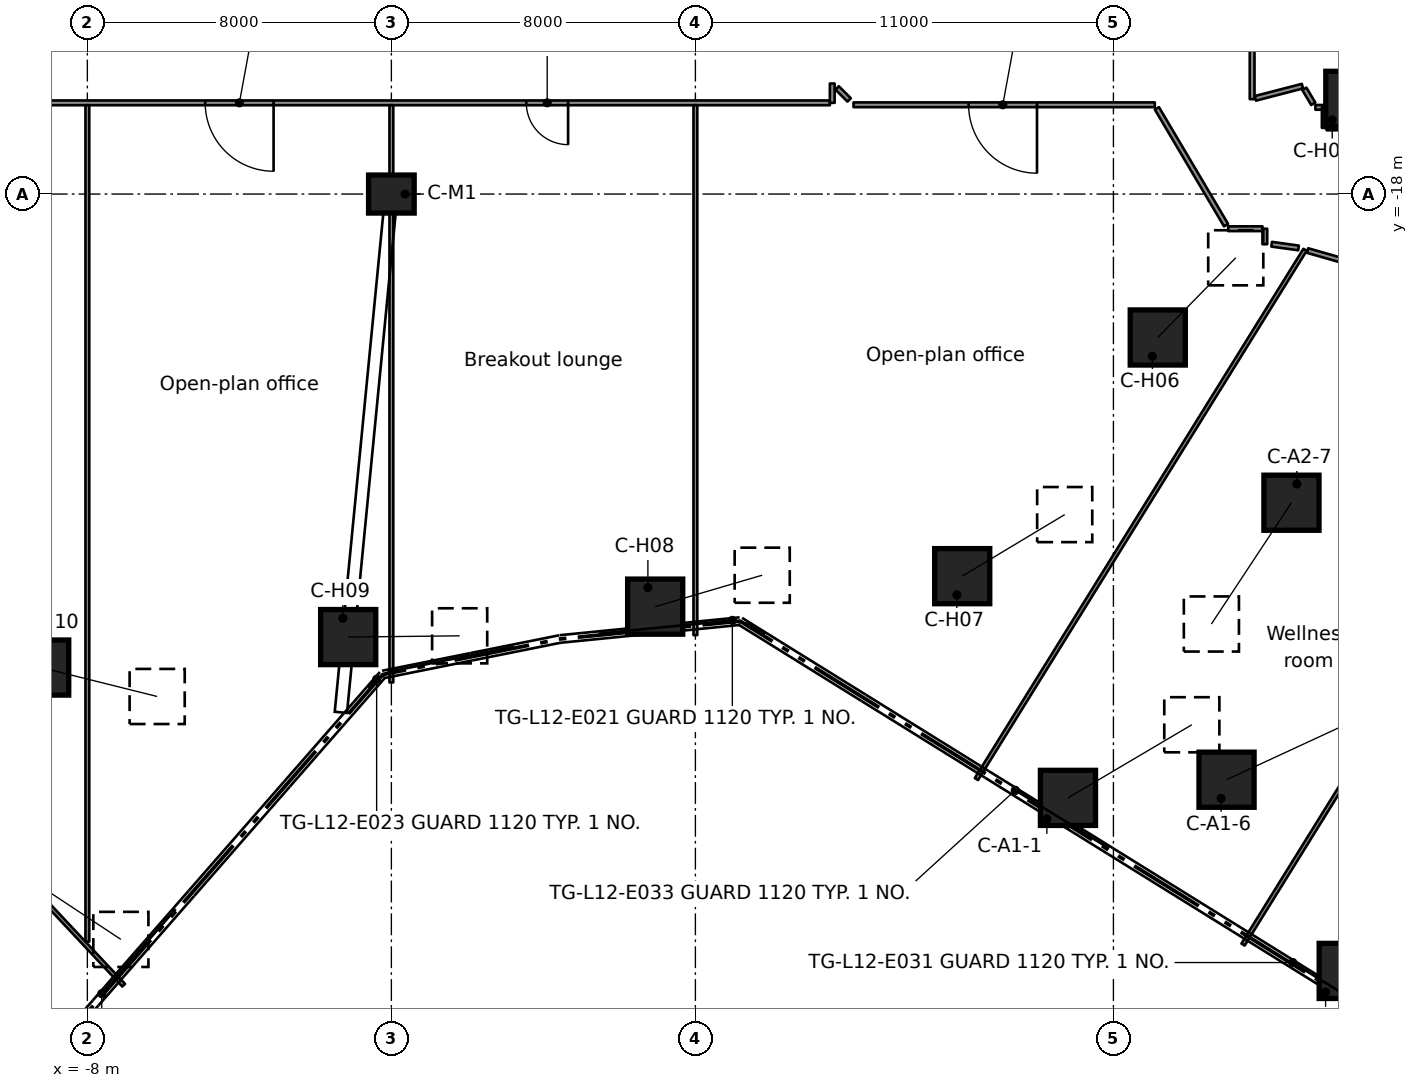
"""IFC4 building model, lengths in metres.
Left out: names, types, materials, properties, quantities, classifications, styles, units other than length and angle.
Written with IfcOpenShell. Run it as: python <this file> out.ifc"""

import sys

from ifc_helpers import new_model, si_unit, direction, frame, frame_2d, origin, origin_2d, place, context, subcontext, project, spatial, rectangle, extrude, element, fill, save


model = new_model("IFC4")
c1 = context("Model", 3, precision=1e-05, world=origin(), true_north=direction((0.0, 1.0)))
c2 = subcontext(c1, "Body", "Model", "MODEL_VIEW")
j1 = project(units=[si_unit("LENGTHUNIT", "METRE"), si_unit("PLANEANGLEUNIT", "RADIAN")], contexts=[c1])
p1 = place(None, origin())
s1 = spatial("IfcSite", under=j1, at=p1, CompositionType="ELEMENT")
p2 = place(p1, origin())
s2 = spatial("IfcBuilding", under=s1, at=p2, CompositionType="ELEMENT")
p3 = place(p2, frame((0.0, 0.0, 54.8)))
s3 = spatial("IfcBuildingStorey", under=s2, at=p3, CompositionType="ELEMENT", Elevation=54.8)
p4 = place(p3, frame((17.804, -33.888, 0.58), z_axis=(0.688751767503, 0.406574569475, 0.600265043309), x_axis=(-0.508344567939, 0.861153761094, 0.0)))
e1 = element("IfcColumn", 1, at=p4, inside=s3, PredefinedType="COLUMN", context=c2, shape_type="SweptSolid", body=[
    extrude(rectangle(XDim=1.45, YDim=1.45, at=origin_2d()), origin(), (0.0, 0.0, 1.0), 4.732),
])
p5 = place(p3, frame((25.139, -38.441, 0.626), z_axis=(0.728944787886, 0.462994187954, 0.504257749702), x_axis=(-0.536150164507, 0.844122622075, 0.0)))
e2 = element("IfcColumn", 2, at=p5, inside=s3, PredefinedType="COLUMN", context=c2, shape_type="SweptSolid", body=[
    extrude(rectangle(XDim=1.45, YDim=1.45, at=origin_2d()), origin(), (0.0, 0.0, 1.0), 5.449),
])
p6 = place(p3, frame((21.977, -33.41, 0.618), z_axis=(0.773592017011, 0.357927187713, 0.522918272306), x_axis=(-0.419913655206, 0.907564059542, 0.0)))
e3 = element("IfcColumn", 3, at=p6, inside=s3, PredefinedType="COLUMN", context=c2, shape_type="SweptSolid", body=[
    extrude(rectangle(XDim=1.45, YDim=1.45, at=origin_2d()), origin(), (0.0, 0.0, 1.0), 5.286),
])
p7 = place(p3, frame((23.685, -26.122, 0.582), z_axis=(-0.442655647447, -0.670317380621, 0.59559263513), x_axis=(0.834468487345, -0.551055662913, 0.0)))
e4 = element("IfcColumn", 4, at=p7, inside=s3, PredefinedType="COLUMN", context=c2, shape_type="SweptSolid", body=[
    extrude(rectangle(XDim=1.45, YDim=1.45, at=origin_2d()), origin(), (0.0, 0.0, 1.0), 4.76),
])
p8 = place(p3, frame((-12.065, -34.341, 0.661), z_axis=(0.7601997226, -0.502647973321, 0.41163259914), x_axis=(0.551542261088, 0.834146950024, 0.0)))
e5 = element("IfcColumn", 5, at=p8, inside=s3, PredefinedType="COLUMN", context=c2, shape_type="SweptSolid", body=[
    extrude(rectangle(XDim=1.45, YDim=1.45, at=origin_2d()), origin(), (0.0, 0.0, 1.0), 6.508),
])
p9 = place(p3, frame((25.313, -15.495, 0.508), z_axis=(0.336025835882, 0.61545416164, 0.71295358372), x_axis=(-0.877701520343, 0.479207722379, 0.0)))
e6 = element("IfcColumn", 6, at=p9, inside=s3, PredefinedType="COLUMN", context=c2, shape_type="SweptSolid", body=[
    extrude(rectangle(XDim=1.45, YDim=1.45, at=origin_2d()), origin(), (0.0, 0.0, 1.0), 4.184),
])
p10 = place(p3, frame((20.167, -21.774, 0.508), z_axis=(0.490424057431, 0.501160289027, 0.712967466716), x_axis=(-0.714720981693, 0.699409692761, 0.0)))
e7 = element("IfcColumn", 7, at=p10, inside=s3, PredefinedType="COLUMN", context=c2, shape_type="SweptSolid", body=[
    extrude(rectangle(XDim=1.45, YDim=1.45, at=origin_2d()), origin(), (0.0, 0.0, 1.0), 4.184),
])
p11 = place(p3, frame((15.021, -28.054, 0.53), z_axis=(0.626275485165, 0.376150796059, 0.682854007315), x_axis=(-0.514883708566, 0.857260034443, 0.0)))
e8 = element("IfcColumn", 8, at=p11, inside=s3, PredefinedType="COLUMN", context=c2, shape_type="SweptSolid", body=[
    extrude(rectangle(XDim=1.45, YDim=1.45, at=origin_2d()), origin(), (0.0, 0.0, 1.0), 4.306),
])
p12 = place(p3, frame((6.942, -28.856, 0.509), z_axis=(0.672955189678, 0.197598545942, 0.712801604464), x_axis=(-0.281733966191, 0.959492559791, 0.0)))
e9 = element("IfcColumn", 9, at=p12, inside=s3, PredefinedType="COLUMN", context=c2, shape_type="SweptSolid", body=[
    extrude(rectangle(XDim=1.45, YDim=1.45, at=origin_2d()), origin(), (0.0, 0.0, 1.0), 4.185),
])
p13 = place(p3, frame((-1.136, -29.657, 0.508), z_axis=(0.701048970737, 0.007877610375, 0.713069620643), x_axis=(-0.011236180934, 0.999936872126, 0.0)))
e10 = element("IfcColumn", 10, at=p13, inside=s3, PredefinedType="COLUMN", context=c2, shape_type="SweptSolid", body=[
    extrude(rectangle(XDim=1.45, YDim=1.45, at=origin_2d()), origin(), (0.0, 0.0, 1.0), 4.184),
])
p14 = place(p3, frame((-9.215, -30.459, 0.53), z_axis=(0.708756376313, -0.176721352289, 0.682959707948), x_axis=(0.241932903281, 0.970292981686, 0.0)))
e11 = element("IfcColumn", 11, at=p14, inside=s3, PredefinedType="COLUMN", context=c2, shape_type="SweptSolid", body=[
    extrude(rectangle(XDim=1.45, YDim=1.45, at=origin_2d()), origin(), (0.0, 0.0, 1.0), 4.306),
])
p15 = place(p3, frame((0.0, -18.0, 0.0), z_axis=(0.0, 0.0, 1.0), x_axis=(1.0, 0.0, 0.0)))
e12 = element("IfcColumn", 12, at=p15, inside=s3, PredefinedType="COLUMN", context=c2, shape_type="SweptSolid", body=[
    extrude(rectangle(XDim=1.2, YDim=1.0, at=origin_2d()), origin(), (0.0, 0.0, 1.0), 4.0),
])
p16 = place(p3, frame((20.145, -15.745, 0.0), z_axis=(0.0, 0.0, 1.0), x_axis=(0.509399422691, -0.860530201772, 0.0)))
e13 = element("IfcWall", 13, at=p16, inside=s3, PredefinedType="PARTITIONING", context=c2, shape_type="SweptSolid", body=[
    extrude(rectangle(XDim=3.571, YDim=0.125, at=frame_2d((1.786, 0.0))), origin(), (0.0, 0.0, 1.0), 3.58),
])
p17 = place(p3, frame((24.024, -15.23, 0.0), z_axis=(0.0, 0.0, 1.0), x_axis=(0.511446511309, -0.859315114536, 0.0)))
e14 = element("IfcWall", 14, at=p17, inside=s3, PredefinedType="PARTITIONING", context=c2, shape_type="SweptSolid", body=[
    extrude(rectangle(XDim=0.46, YDim=0.125, at=frame_2d((0.23, 0.0))), origin(), (0.0, 0.0, 1.0), 3.58),
])
p18 = place(p3, frame((-16.813, -28.402, 0.0), z_axis=(0.0, 0.0, 1.0), x_axis=(0.684091249036, -0.729396437469, 0.0)))
e15 = element("IfcWall", 15, at=p18, inside=s3, PredefinedType="PARTITIONING", context=c2, shape_type="SweptSolid", body=[
    extrude(rectangle(XDim=14.28, YDim=0.1, at=frame_2d((7.14, 0.0))), origin(), (0.0, 0.0, 1.0), 3.58),
])
p19 = place(p3, frame((11.73, -15.207, 0.0), z_axis=(0.0, 0.0, 1.0), x_axis=(0.707106781187, -0.707106781187, 0.0)))
e16 = element("IfcWall", 16, at=p19, inside=s3, PredefinedType="PARTITIONING", context=c2, shape_type="SweptSolid", body=[
    extrude(rectangle(XDim=0.447, YDim=0.125, at=frame_2d((0.223, 0.0))), origin(), (0.0, 0.0, 1.0), 3.58),
])
p20 = place(p3, frame((27.518, -20.464, 0.0), z_axis=(0.0, 0.0, 1.0), x_axis=(-0.961227263948, 0.275757406143, 0.0)))
e17 = element("IfcWall", 17, at=p20, inside=s3, PredefinedType="PARTITIONING", context=c2, shape_type="SweptSolid", body=[
    extrude(rectangle(XDim=3.547, YDim=0.125, at=frame_2d((1.773, 0.0))), origin(), (0.0, 0.0, 1.0), 3.58),
])
p21 = place(p20, frame((1.288, 0.0, 0.0)))
e18 = element("IfcOpeningElement", 18, at=p21, cuts=e17, PredefinedType="OPENING", context=c2, shape_type="SweptSolid", body=[
    extrude(rectangle(XDim=0.9, YDim=2.1, at=frame_2d((0.45, 1.05))), frame((0.0, 0.073, 0.0), z_axis=(0.0, -1.0, 0.0), x_axis=(1.0, 0.0, 0.0)), (0.0, 0.0, 1.0), 0.145),
])
p22 = place(p3, frame((23.164, -19.32, 0.0), z_axis=(0.0, 0.0, 1.0), x_axis=(0.990549151852, -0.137158221648, 0.0)))
e19 = element("IfcWall", 19, at=p22, inside=s3, PredefinedType="PARTITIONING", context=c2, shape_type="SweptSolid", body=[
    extrude(rectangle(XDim=0.714, YDim=0.125, at=frame_2d((0.357, 0.0))), origin(), (0.0, 0.0, 1.0), 3.58),
])
p23 = place(p3, frame((22.02, -18.912, 0.0), z_axis=(0.0, 0.0, 1.0), x_axis=(1.0, 0.0, 0.0)))
e20 = element("IfcWall", 20, at=p23, inside=s3, PredefinedType="PARTITIONING", context=c2, shape_type="SweptSolid", body=[
    extrude(rectangle(XDim=0.902, YDim=0.125, at=frame_2d((0.451, 0.0))), origin(), (0.0, 0.0, 1.0), 3.58),
])
p24 = place(p3, frame((24.61, -16.259, 0.0), z_axis=(0.0, 0.0, 1.0), x_axis=(1.0, 0.0, 0.0)))
e21 = element("IfcWall", 21, at=p24, inside=s3, PredefinedType="PARTITIONING", context=c2, shape_type="SweptSolid", body=[
    extrude(rectangle(XDim=1.423, YDim=0.125, at=frame_2d((0.711, 0.0))), origin(), (0.0, 0.0, 1.0), 3.58),
])
p25 = place(p3, frame((24.315, -15.719, 0.0), z_axis=(0.0, 0.0, 1.0), x_axis=(1.0, 0.0, 0.0)))
e22 = element("IfcWall", 22, at=p25, inside=s3, PredefinedType="PARTITIONING", context=c2, shape_type="SweptSolid", body=[
    extrude(rectangle(XDim=0.233, YDim=0.125, at=frame_2d((0.117, 0.0))), origin(), (0.0, 0.0, 1.0), 3.58),
])
p26 = place(p3, frame((20.089, -15.651, 0.0), z_axis=(0.0, 0.0, 1.0), x_axis=(-1.0, 0.0, 0.0)))
e23 = element("IfcWall", 23, at=p26, inside=s3, PredefinedType="PARTITIONING", context=c2, shape_type="SweptSolid", body=[
    extrude(rectangle(XDim=7.928, YDim=0.125, at=frame_2d((3.964, 0.0))), origin(), (0.0, 0.0, 1.0), 3.58),
])
p27 = place(p26, frame((3.1, 0.0, 0.0)))
e24 = element("IfcOpeningElement", 24, at=p27, cuts=e23, PredefinedType="OPENING", context=c2, shape_type="SweptSolid", body=[
    extrude(rectangle(XDim=1.8, YDim=2.1, at=frame_2d((0.9, 1.05))), frame((0.0, 0.073, 0.0), z_axis=(0.0, -1.0, 0.0), x_axis=(1.0, 0.0, 0.0)), (0.0, 0.0, 1.0), 0.145),
])
p28 = place(p3, frame((11.539, -15.6, 0.0), z_axis=(0.0, 0.0, 1.0), x_axis=(-1.0, 0.0, 0.0)))
e25 = element("IfcWall", 25, at=p28, inside=s3, PredefinedType="PARTITIONING", context=c2, shape_type="SweptSolid", body=[
    extrude(rectangle(XDim=23.139, YDim=0.125, at=frame_2d((11.57, 0.0))), origin(), (0.0, 0.0, 1.0), 3.58),
])
p29 = place(p28, frame((14.638, 0.0, 0.0)))
e26 = element("IfcOpeningElement", 26, at=p29, cuts=e25, PredefinedType="OPENING", context=c2, shape_type="SweptSolid", body=[
    extrude(rectangle(XDim=1.8, YDim=2.1, at=frame_2d((0.9, 1.05))), frame((0.0, 0.073, 0.0), z_axis=(0.0, -1.0, 0.0), x_axis=(1.0, 0.0, 0.0)), (0.0, 0.0, 1.0), 0.145),
])
p30 = place(p28, frame((6.888, 0.0, 0.0)))
e27 = element("IfcOpeningElement", 27, at=p30, cuts=e25, PredefinedType="OPENING", context=c2, shape_type="SweptSolid", body=[
    extrude(rectangle(XDim=1.1, YDim=2.1, at=frame_2d((0.55, 1.05))), frame((0.0, 0.073, 0.0), z_axis=(0.0, -1.0, 0.0), x_axis=(1.0, 0.0, 0.0)), (0.0, 0.0, 1.0), 0.145),
])
p31 = place(p3, frame((22.735, -15.482, 0.0), z_axis=(0.0, 0.0, 1.0), x_axis=(0.968031213417, 0.250829762688, 0.0)))
e28 = element("IfcWall", 28, at=p31, inside=s3, PredefinedType="PARTITIONING", context=c2, shape_type="SweptSolid", body=[
    extrude(rectangle(XDim=1.28, YDim=0.125, at=frame_2d((0.64, 0.0))), origin(), (0.0, 0.0, 1.0), 3.58),
])
p32 = place(p3, frame((22.411, -37.748, 0.0), z_axis=(0.0, 0.0, 1.0), x_axis=(0.527469619433, 0.849573893535, 0.0)))
e29 = element("IfcWall", 29, at=p32, inside=s3, PredefinedType="PARTITIONING", context=c2, shape_type="SweptSolid", body=[
    extrude(rectangle(XDim=15.597, YDim=0.1, at=frame_2d((7.799, 0.0))), origin(), (0.0, 0.0, 1.0), 3.58),
])
p33 = place(p3, frame((15.395, -33.393, 0.0), z_axis=(0.0, 0.0, 1.0), x_axis=(0.52750522029, 0.84955178922, 0.0)))
e30 = element("IfcWall", 30, at=p33, inside=s3, PredefinedType="PARTITIONING", context=c2, shape_type="SweptSolid", body=[
    extrude(rectangle(XDim=16.392, YDim=0.1, at=frame_2d((8.196, 0.0))), origin(), (0.0, 0.0, 1.0), 3.58),
])
p34 = place(p3, frame((24.548, -16.259, 0.0), z_axis=(0.0, 0.0, 1.0), x_axis=(0.0, 1.0, 0.0)))
e31 = element("IfcWall", 31, at=p34, inside=s3, PredefinedType="PARTITIONING", context=c2, shape_type="SweptSolid", body=[
    extrude(rectangle(XDim=0.54, YDim=0.125, at=frame_2d((0.27, 0.0))), origin(), (0.0, 0.0, 1.0), 3.58),
])
p35 = place(p3, frame((22.984, -19.32, 0.0), z_axis=(0.0, 0.0, 1.0), x_axis=(0.0, 1.0, 0.0)))
e32 = element("IfcWall", 32, at=p35, inside=s3, PredefinedType="PARTITIONING", context=c2, shape_type="SweptSolid", body=[
    extrude(rectangle(XDim=0.408, YDim=0.125, at=frame_2d((0.204, 0.0))), origin(), (0.0, 0.0, 1.0), 3.58),
])
p36 = place(p3, frame((22.65, 15.651, 0.0), z_axis=(0.0, 0.0, 1.0), x_axis=(0.0, -1.0, 0.0)))
e33 = element("IfcWall", 33, at=p36, inside=s3, PredefinedType="PARTITIONING", context=c2, shape_type="SweptSolid", body=[
    extrude(rectangle(XDim=31.154, YDim=0.125, at=frame_2d((15.577, 0.0))), origin(), (0.0, 0.0, 1.0), 3.58),
])
p37 = place(p36, frame((26.929, 0.0, 0.0)))
e34 = element("IfcOpeningElement", 34, at=p37, cuts=e33, PredefinedType="OPENING", context=c2, shape_type="SweptSolid", body=[
    extrude(rectangle(XDim=0.9, YDim=2.1, at=frame_2d((0.45, 1.05))), frame((0.0, 0.073, 0.0), z_axis=(0.0, -1.0, 0.0), x_axis=(1.0, 0.0, 0.0)), (0.0, 0.0, 1.0), 0.145),
])
p38 = place(p36, frame((22.929, 0.0, 0.0)))
e35 = element("IfcOpeningElement", 35, at=p38, cuts=e33, PredefinedType="OPENING", context=c2, shape_type="SweptSolid", body=[
    extrude(rectangle(XDim=0.9, YDim=2.1, at=frame_2d((0.45, 1.05))), frame((0.0, 0.073, 0.0), z_axis=(0.0, -1.0, 0.0), x_axis=(1.0, 0.0, 0.0)), (0.0, 0.0, 1.0), 0.145),
])
p39 = place(p36, frame((4.35, 0.0, 0.0)))
e36 = element("IfcOpeningElement", 36, at=p39, cuts=e33, PredefinedType="OPENING", context=c2, shape_type="SweptSolid", body=[
    extrude(rectangle(XDim=0.9, YDim=2.1, at=frame_2d((0.45, 1.05))), frame((0.0, 0.073, 0.0), z_axis=(0.0, -1.0, 0.0), x_axis=(1.0, 0.0, 0.0)), (0.0, 0.0, 1.0), 0.145),
])
p40 = place(p36, frame((11.93, 0.0, 0.0)))
e37 = element("IfcOpeningElement", 37, at=p40, cuts=e33, PredefinedType="OPENING", context=c2, shape_type="SweptSolid", body=[
    extrude(rectangle(XDim=1.1, YDim=2.1, at=frame_2d((0.55, 1.05))), frame((0.0, 0.073, 0.0), z_axis=(0.0, -1.0, 0.0), x_axis=(1.0, 0.0, 0.0)), (0.0, 0.0, 1.0), 0.145),
])
p41 = place(p3, frame((11.601, -15.6, 0.0), z_axis=(0.0, 0.0, 1.0), x_axis=(0.0, 1.0, 0.0)))
e38 = element("IfcWall", 38, at=p41, inside=s3, PredefinedType="PARTITIONING", context=c2, shape_type="SweptSolid", body=[
    extrude(rectangle(XDim=0.508, YDim=0.125, at=frame_2d((0.254, 0.0))), origin(), (0.0, 0.0, 1.0), 3.58),
])
p42 = place(p3, frame((8.0, -29.605, 0.0), z_axis=(0.0, 0.0, 1.0), x_axis=(0.0, 1.0, 0.0)))
e39 = element("IfcWall", 39, at=p42, inside=s3, PredefinedType="PARTITIONING", context=c2, shape_type="SweptSolid", body=[
    extrude(rectangle(XDim=13.943, YDim=0.1, at=frame_2d((6.971, 0.0))), origin(), (0.0, 0.0, 1.0), 3.58),
])
p43 = place(p3, frame((0.0, -30.851, 0.0), z_axis=(0.0, 0.0, 1.0), x_axis=(0.0, 1.0, 0.0)))
e40 = element("IfcWall", 40, at=p43, inside=s3, PredefinedType="PARTITIONING", context=c2, shape_type="SweptSolid", body=[
    extrude(rectangle(XDim=15.189, YDim=0.1, at=frame_2d((7.594, 0.0))), origin(), (0.0, 0.0, 1.0), 3.58),
])
p44 = place(p3, frame((-8.0, -37.672, 0.0), z_axis=(0.0, 0.0, 1.0), x_axis=(0.0, 1.0, 0.0)))
e41 = element("IfcWall", 41, at=p44, inside=s3, PredefinedType="PARTITIONING", context=c2, shape_type="SweptSolid", body=[
    extrude(rectangle(XDim=22.01, YDim=0.1, at=frame_2d((11.005, 0.0))), origin(), (0.0, 0.0, 1.0), 3.58),
])
p45 = place(p29, origin())
e42 = element("IfcDoor", 42, at=p45, inside=s3, OperationType="DOUBLE_DOOR_SINGLE_SWING", PredefinedType="DOOR", context=c2, shape_type="SweptSolid", body=[
    extrude(rectangle(XDim=1.8, YDim=2.1, at=frame_2d((0.9, 1.05))), frame((0.0, 0.025, 0.0), z_axis=(0.0, -1.0, 0.0), x_axis=(1.0, 0.0, 0.0)), (0.0, 0.0, 1.0), 0.05),
])
fill(e26, e42)
p46 = place(p30, origin())
e43 = element("IfcDoor", 43, at=p46, inside=s3, OperationType="SINGLE_SWING_LEFT", PredefinedType="DOOR", context=c2, shape_type="SweptSolid", body=[
    extrude(rectangle(XDim=1.1, YDim=2.1, at=frame_2d((0.55, 1.05))), frame((0.0, 0.025, 0.0), z_axis=(0.0, -1.0, 0.0), x_axis=(1.0, 0.0, 0.0)), (0.0, 0.0, 1.0), 0.05),
])
fill(e27, e43)
p47 = place(p27, origin())
e44 = element("IfcDoor", 44, at=p47, inside=s3, OperationType="DOUBLE_DOOR_SINGLE_SWING", PredefinedType="DOOR", context=c2, shape_type="SweptSolid", body=[
    extrude(rectangle(XDim=1.8, YDim=2.1, at=frame_2d((0.9, 1.05))), frame((0.0, 0.025, 0.0), z_axis=(0.0, -1.0, 0.0), x_axis=(1.0, 0.0, 0.0)), (0.0, 0.0, 1.0), 0.05),
])
fill(e24, e44)
save(model, sys.argv[1])
